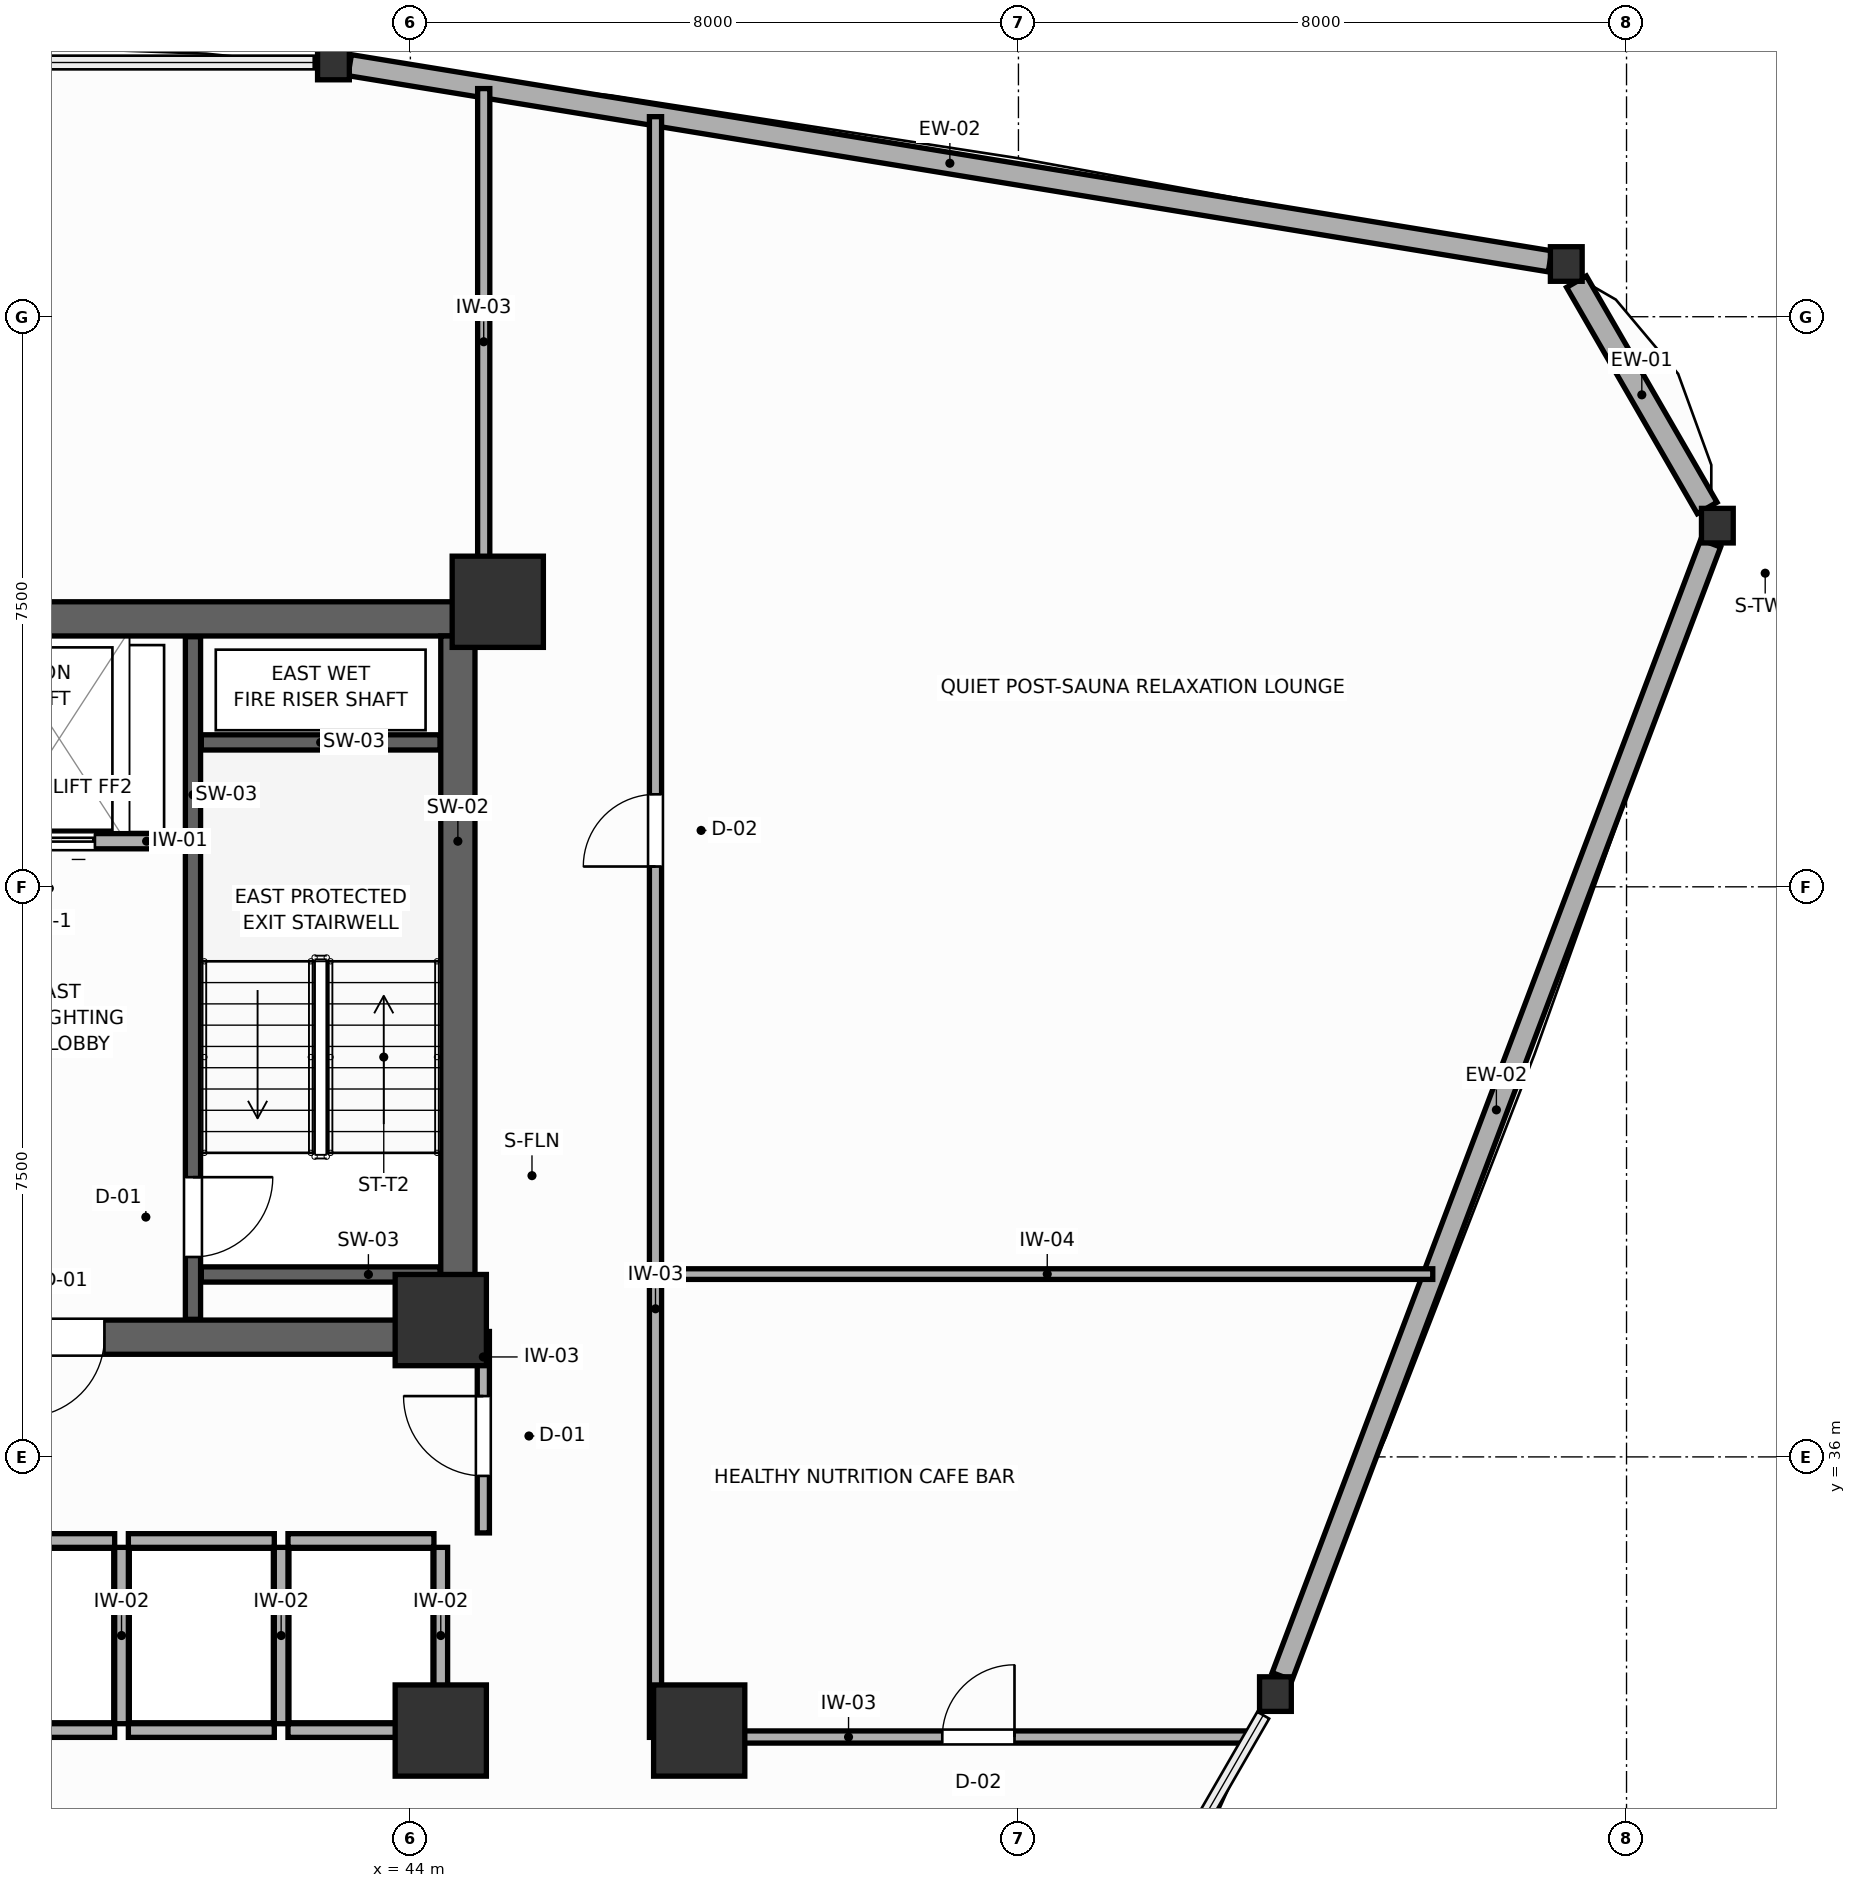
"""IFC4 building model, lengths in metres.
Left out: names, types, materials, properties, quantities, classifications, styles, units other than length and angle.
Written with IfcOpenShell. Run it as: python <this file> out.ifc"""

import sys

from ifc_helpers import new_model, si_unit, direction, frame, frame_2d, origin, origin_2d, place, context, subcontext, project, spatial, rectangle, i_section, extrude, source, transform, mapped, element, fill, save


model = new_model("IFC4")
c1 = context("Model", 3, precision=1e-05, world=origin(), true_north=direction((0.0, 1.0)))
c2 = subcontext(c1, "Body", "Model", "MODEL_VIEW")
j1 = project(units=[si_unit("LENGTHUNIT", "METRE"), si_unit("PLANEANGLEUNIT", "RADIAN")], contexts=[c1])
p1 = place(None, origin())
s1 = spatial("IfcSite", under=j1, at=p1, CompositionType="ELEMENT")
p2 = place(p1, origin())
s2 = spatial("IfcBuilding", under=s1, at=p2, CompositionType="ELEMENT")
p3 = place(p2, frame((0.0, 0.0, 113.4)))
s3 = spatial("IfcBuildingStorey", under=s2, at=p3, CompositionType="ELEMENT", Elevation=113.4)
p4 = place(p3, frame((27.15, 47.025, 0.0), z_axis=(0.0, 0.0, 1.0), x_axis=(1.0, 0.0, 0.0)))
e1 = element("IfcWall", 1, at=p4, inside=s3, PredefinedType="SHEAR", context=c2, shape_type="SweptSolid", body=[
    extrude(rectangle(XDim=17.7, YDim=0.45, at=frame_2d((8.85, 0.0))), origin(), (0.0, 0.0, 1.0), 3.6),
])
p5 = place(p3, frame((27.15, 37.575, 0.0), z_axis=(0.0, 0.0, 1.0), x_axis=(1.0, 0.0, 0.0)))
e2 = element("IfcWall", 2, at=p5, inside=s3, PredefinedType="SHEAR", context=c2, shape_type="SweptSolid", body=[
    extrude(rectangle(XDim=17.7, YDim=0.45, at=frame_2d((8.85, 0.0))), origin(), (0.0, 0.0, 1.0), 3.6),
])
p6 = place(p5, frame((4.875, 0.0, 0.0)))
e3 = element("IfcOpeningElement", 3, at=p6, cuts=e2, PredefinedType="OPENING", context=c2, shape_type="SweptSolid", body=[
    extrude(rectangle(XDim=1.05, YDim=2.1, at=frame_2d((0.525, 1.05))), frame((0.0, 0.235, 0.0), z_axis=(0.0, -1.0, 0.0), x_axis=(1.0, 0.0, 0.0)), (0.0, 0.0, 1.0), 0.47),
])
p7 = place(p5, frame((11.775, 0.0, 0.0)))
e4 = element("IfcOpeningElement", 4, at=p7, cuts=e2, PredefinedType="OPENING", context=c2, shape_type="SweptSolid", body=[
    extrude(rectangle(XDim=1.05, YDim=2.1, at=frame_2d((0.525, 1.05))), frame((0.0, 0.235, 0.0), z_axis=(0.0, -1.0, 0.0), x_axis=(1.0, 0.0, 0.0)), (0.0, 0.0, 1.0), 0.47),
])
p8 = place(p3, frame((44.625, 37.8, 0.0), z_axis=(0.0, 0.0, 1.0), x_axis=(0.0, 1.0, 0.0)))
e5 = element("IfcWall", 5, at=p8, inside=s3, PredefinedType="SHEAR", context=c2, shape_type="SweptSolid", body=[
    extrude(rectangle(XDim=9.0, YDim=0.45, at=frame_2d((4.5, 0.0))), origin(), (0.0, 0.0, 1.0), 3.6),
])
m1 = source(origin(), c2, "Body", "SweptSolid", [
    extrude(rectangle(XDim=1.2, YDim=1.2, at=origin_2d()), origin(), (0.0, 0.0, 1.0), 3.6),
])
for number, where, z_axis, x_axis in (
    (6, (45.15, 47.25, 0.0), (0.0, 0.0, 1.0), (1.0, 0.0, 0.0)),
    (7, (44.4, 37.8, 0.0), (0.0, 0.0, 1.0), (1.0, 0.0, 0.0)),
    (8, (44.4, 32.4, 0.0), (0.0, 0.0, 1.0), (1.0, 0.0, 0.0)),
    (9, (47.8, 32.4, 0.0), (0.0, 0.0, 1.0), (1.0, 0.0, 0.0)),
):
    element("IfcColumn", number, at=place(p3, frame(where, z_axis=z_axis, x_axis=x_axis)), inside=s3, PredefinedType="COLUMN", context=c2, shape_type="MappedRepresentation", body=[
        mapped(m1, transform((0.0, 0.0, 0.0), scale=1.0)),
    ])
m2 = source(origin(), c2, "Body", "SweptSolid", [
    extrude(i_section(OverallWidth=0.418, OverallDepth=0.455, WebThickness=0.039, FlangeThickness=0.063, FilletRadius=0.015, at=origin_2d()), origin(), (0.0, 0.0, 1.0), 3.6),
])
for number, where, z_axis, x_axis in (
    (10, (61.195, 48.251, 0.0), (0.0, 0.0, 1.0), (1.0, 0.0, 0.0)),
    (11, (59.208, 51.694, 0.0), (0.0, 0.0, 1.0), (1.0, 0.0, 0.0)),
    (12, (42.988, 54.344, 0.0), (0.0, 0.0, 1.0), (1.0, 0.0, 0.0)),
    (13, (55.381, 32.879, 0.0), (0.0, 0.0, 1.0), (1.0, 0.0, 0.0)),
):
    element("IfcColumn", number, at=place(p3, frame(where, z_axis=z_axis, x_axis=x_axis)), inside=s3, PredefinedType="COLUMN", context=c2, shape_type="MappedRepresentation", body=[
        mapped(m2, transform((0.0, 0.0, 0.0), scale=1.0)),
    ])
p9 = place(p3, frame((61.061, 48.484, 0.0), z_axis=(0.0, 0.0, 1.0), x_axis=(-0.500064626416, 0.86598808849, 0.0)))
e14 = element("IfcWall", 14, at=p9, inside=s3, PredefinedType="SOLIDWALL", context=c2, shape_type="SweptSolid", body=[
    extrude(rectangle(XDim=3.438, YDim=0.3, at=frame_2d((1.719, 0.0))), origin(), (0.0, 0.0, 1.0), 1.87),
])
p10 = place(p3, frame((58.993, 51.729, 0.0), z_axis=(0.0, 0.0, 1.0), x_axis=(-0.98690696995, 0.161290522546, 0.0)))
e15 = element("IfcWall", 15, at=p10, inside=s3, PredefinedType="SOLIDWALL", context=c2, shape_type="SweptSolid", body=[
    extrude(rectangle(XDim=16.001, YDim=0.28, at=frame_2d((8.0, 0.0))), origin(), (0.0, 0.0, 1.0), 1.87),
])
p11 = place(p3, frame((55.469, 33.112, 0.0), z_axis=(0.0, 0.0, 1.0), x_axis=(0.353771130195, 0.935332019895, 0.0)))
e16 = element("IfcWall", 16, at=p11, inside=s3, PredefinedType="SOLIDWALL", context=c2, shape_type="SweptSolid", body=[
    extrude(rectangle(XDim=15.937, YDim=0.28, at=frame_2d((7.969, 0.0))), origin(), (0.0, 0.0, 1.0), 1.87),
])
p12 = place(p3, frame((41.14, 37.81, 0.0), z_axis=(0.0, 0.0, 1.0), x_axis=(0.0, 1.0, 0.0)))
e17 = element("IfcWall", 17, at=p12, inside=s3, PredefinedType="SHEAR", context=c2, shape_type="SweptSolid", body=[
    extrude(rectangle(XDim=8.98, YDim=0.2, at=frame_2d((4.49, 0.0))), origin(), (0.0, 0.0, 1.0), 3.6),
])
p13 = place(p12, frame((0.82, 0.0, 0.0)))
e18 = element("IfcOpeningElement", 18, at=p13, cuts=e17, PredefinedType="OPENING", context=c2, shape_type="SweptSolid", body=[
    extrude(rectangle(XDim=1.05, YDim=2.1, at=frame_2d((0.525, 1.05))), frame((0.0, 0.11, 0.0), z_axis=(0.0, -1.0, 0.0), x_axis=(1.0, 0.0, 0.0)), (0.0, 0.0, 1.0), 0.22),
])
for number, where, z_axis, x_axis in (
    (19, (41.25, 45.4, 0.0), (0.0, 0.0, 1.0), (1.0, 0.0, 0.0)),
    (20, (41.25, 38.4, 0.0), (0.0, 0.0, 1.0), (1.0, 0.0, 0.0)),
):
    element("IfcWall", number, at=place(p3, frame(where, z_axis=z_axis, x_axis=x_axis)), inside=s3, PredefinedType="SHEAR", context=c2, shape_type="SweptSolid", body=[
        extrude(rectangle(XDim=3.14, YDim=0.2, at=frame_2d((1.57, 0.0))), origin(), (0.0, 0.0, 1.0), 3.6),
    ])
p14 = place(p3, frame((37.65, 44.1, 0.0), z_axis=(0.0, 0.0, 1.0), x_axis=(1.0, 0.0, 0.0)))
e21 = element("IfcWall", 21, at=p14, inside=s3, PredefinedType="PARTITIONING", context=c2, shape_type="SweptSolid", body=[
    extrude(rectangle(XDim=3.38, YDim=0.2, at=frame_2d((1.69, 0.0))), origin(), (0.0, 0.0, 1.0), 3.4),
])
p15 = place(p14, frame((1.0, 0.0, 0.0)))
e22 = element("IfcOpeningElement", 22, at=p15, cuts=e21, PredefinedType="OPENING", context=c2, shape_type="SweptSolid", body=[
    extrude(rectangle(XDim=1.2, YDim=2.1, at=frame_2d((0.6, 1.05))), frame((0.0, 0.11, 0.0), z_axis=(0.0, -1.0, 0.0), x_axis=(1.0, 0.0, 0.0)), (0.0, 0.0, 1.0), 0.22),
])
p16 = place(p3, frame((38.19, 34.9, 0.0), z_axis=(0.0, 0.0, 1.0), x_axis=(1.0, 0.0, 0.0)))
e23 = element("IfcWall", 23, at=p16, inside=s3, PredefinedType="PARTITIONING", context=c2, shape_type="SweptSolid", body=[
    extrude(rectangle(XDim=1.92, YDim=0.18, at=frame_2d((0.96, 0.0))), origin(), (0.0, 0.0, 1.0), 3.4),
])
p17 = place(p3, frame((38.19, 32.4, 0.0), z_axis=(0.0, 0.0, 1.0), x_axis=(1.0, 0.0, 0.0)))
e24 = element("IfcWall", 24, at=p17, inside=s3, PredefinedType="PARTITIONING", context=c2, shape_type="SweptSolid", body=[
    extrude(rectangle(XDim=1.92, YDim=0.18, at=frame_2d((0.96, 0.0))), origin(), (0.0, 0.0, 1.0), 2.16),
])
p18 = place(p3, frame((40.29, 34.9, 0.0), z_axis=(0.0, 0.0, 1.0), x_axis=(1.0, 0.0, 0.0)))
e25 = element("IfcWall", 25, at=p18, inside=s3, PredefinedType="PARTITIONING", context=c2, shape_type="SweptSolid", body=[
    extrude(rectangle(XDim=1.92, YDim=0.18, at=frame_2d((0.96, 0.0))), origin(), (0.0, 0.0, 1.0), 3.4),
])
p19 = place(p3, frame((40.29, 32.4, 0.0), z_axis=(0.0, 0.0, 1.0), x_axis=(1.0, 0.0, 0.0)))
e26 = element("IfcWall", 26, at=p19, inside=s3, PredefinedType="PARTITIONING", context=c2, shape_type="SweptSolid", body=[
    extrude(rectangle(XDim=1.92, YDim=0.18, at=frame_2d((0.96, 0.0))), origin(), (0.0, 0.0, 1.0), 2.16),
])
p20 = place(p3, frame((40.2, 32.49, 0.0), z_axis=(0.0, 0.0, 1.0), x_axis=(0.0, 1.0, 0.0)))
e27 = element("IfcWall", 27, at=p20, inside=s3, PredefinedType="PARTITIONING", context=c2, shape_type="SweptSolid", body=[
    extrude(rectangle(XDim=2.32, YDim=0.18, at=frame_2d((1.16, 0.0))), origin(), (0.0, 0.0, 1.0), 3.4),
])
p21 = place(p3, frame((42.39, 34.9, 0.0), z_axis=(0.0, 0.0, 1.0), x_axis=(1.0, 0.0, 0.0)))
e28 = element("IfcWall", 28, at=p21, inside=s3, PredefinedType="PARTITIONING", context=c2, shape_type="SweptSolid", body=[
    extrude(rectangle(XDim=1.92, YDim=0.18, at=frame_2d((0.96, 0.0))), origin(), (0.0, 0.0, 1.0), 3.4),
])
p22 = place(p3, frame((42.39, 32.4, 0.0), z_axis=(0.0, 0.0, 1.0), x_axis=(1.0, 0.0, 0.0)))
e29 = element("IfcWall", 29, at=p22, inside=s3, PredefinedType="PARTITIONING", context=c2, shape_type="SweptSolid", body=[
    extrude(rectangle(XDim=1.92, YDim=0.18, at=frame_2d((0.96, 0.0))), origin(), (0.0, 0.0, 1.0), 2.16),
])
for number, where, z_axis, x_axis in (
    (30, (42.3, 32.49, 0.0), (0.0, 0.0, 1.0), (0.0, 1.0, 0.0)),
    (31, (44.4, 32.49, 0.0), (0.0, 0.0, 1.0), (0.0, 1.0, 0.0)),
):
    element("IfcWall", number, at=place(p3, frame(where, z_axis=z_axis, x_axis=x_axis)), inside=s3, PredefinedType="PARTITIONING", context=c2, shape_type="SweptSolid", body=[
        extrude(rectangle(XDim=2.32, YDim=0.18, at=frame_2d((1.16, 0.0))), origin(), (0.0, 0.0, 1.0), 3.4),
    ])
p23 = place(p3, frame((44.96, 35.0, 0.0), z_axis=(0.0, 0.0, 1.0), x_axis=(0.0, 1.0, 0.0)))
e32 = element("IfcWall", 32, at=p23, inside=s3, PredefinedType="PARTITIONING", context=c2, shape_type="SweptSolid", body=[
    extrude(rectangle(XDim=2.65, YDim=0.16, at=frame_2d((1.325, 0.0))), origin(), (0.0, 0.0, 1.0), 3.4),
])
p24 = place(p23, frame((0.75, 0.0, 0.0)))
e33 = element("IfcOpeningElement", 33, at=p24, cuts=e32, PredefinedType="OPENING", context=c2, shape_type="SweptSolid", body=[
    extrude(rectangle(XDim=1.05, YDim=2.1, at=frame_2d((0.525, 1.05))), frame((0.0, 0.09, 0.0), z_axis=(0.0, -1.0, 0.0), x_axis=(1.0, 0.0, 0.0)), (0.0, 0.0, 1.0), 0.18),
])
p25 = place(p3, frame((47.225, 32.31, 0.0), z_axis=(0.0, 0.0, 1.0), x_axis=(0.0, 1.0, 0.0)))
e34 = element("IfcWall", 34, at=p25, inside=s3, PredefinedType="PARTITIONING", context=c2, shape_type="SweptSolid", body=[
    extrude(rectangle(XDim=21.322, YDim=0.16, at=frame_2d((10.661, 0.0))), origin(), (0.0, 0.0, 1.0), 3.4),
])
p26 = place(p25, frame((11.457, 0.0, 0.0)))
e35 = element("IfcOpeningElement", 35, at=p26, cuts=e34, PredefinedType="OPENING", context=c2, shape_type="SweptSolid", body=[
    extrude(rectangle(XDim=0.95, YDim=2.05, at=frame_2d((0.475, 1.025))), frame((0.0, 0.09, 0.0), z_axis=(0.0, -1.0, 0.0), x_axis=(1.0, 0.0, 0.0)), (0.0, 0.0, 1.0), 0.18),
])
p27 = place(p3, frame((47.307, 32.315, 0.0), z_axis=(0.0, 0.0, 1.0), x_axis=(1.0, 0.0, 0.0)))
e36 = element("IfcWall", 36, at=p27, inside=s3, PredefinedType="PARTITIONING", context=c2, shape_type="SweptSolid", body=[
    extrude(rectangle(XDim=7.728, YDim=0.16, at=frame_2d((3.864, 0.0))), origin(), (0.0, 0.0, 1.0), 2.16),
])
p28 = place(p27, frame((3.691, 0.0, 0.0)))
e37 = element("IfcOpeningElement", 37, at=p28, cuts=e36, PredefinedType="OPENING", context=c2, shape_type="SweptSolid", body=[
    extrude(rectangle(XDim=0.95, YDim=2.05, at=frame_2d((0.475, 1.025))), frame((0.0, 0.09, 0.0), z_axis=(0.0, -1.0, 0.0), x_axis=(1.0, 0.0, 0.0)), (0.0, 0.0, 1.0), 0.18),
])
p29 = place(p3, frame((44.965, 47.34, 0.0), z_axis=(0.0, 0.0, 1.0), x_axis=(0.0, 1.0, 0.0)))
e38 = element("IfcWall", 38, at=p29, inside=s3, PredefinedType="PARTITIONING", context=c2, shape_type="SweptSolid", body=[
    extrude(rectangle(XDim=6.661, YDim=0.16, at=frame_2d((3.331, 0.0))), origin(), (0.0, 0.0, 1.0), 2.16),
])
p30 = place(p3, frame((47.307, 38.405, 0.0), z_axis=(0.0, 0.0, 1.0), x_axis=(1.0, 0.0, 0.0)))
e39 = element("IfcWall", 39, at=p30, inside=s3, PredefinedType="PARTITIONING", context=c2, shape_type="SweptSolid", body=[
    extrude(rectangle(XDim=10.144, YDim=0.14, at=frame_2d((5.072, 0.0))), origin(), (0.0, 0.0, 1.0), 3.4),
])
p31 = place(p13, frame((1.05, 0.0, 0.0), z_axis=(0.0, 0.0, 1.0), x_axis=(-1.0, 0.0, 0.0)))
e40 = element("IfcDoor", 40, at=p31, inside=s3, OperationType="SINGLE_SWING_LEFT", PredefinedType="DOOR", context=c2, shape_type="SweptSolid", body=[
    extrude(rectangle(XDim=1.05, YDim=2.1, at=frame_2d((0.525, 1.05))), frame((0.0, 0.025, 0.0), z_axis=(0.0, -1.0, 0.0), x_axis=(1.0, 0.0, 0.0)), (0.0, 0.0, 1.0), 0.05),
])
fill(e18, e40)
p32 = place(p15, origin())
e41 = element("IfcDoor", 41, at=p32, inside=s3, OperationType="DOUBLE_DOOR_SLIDING", PredefinedType="DOOR", context=c2, shape_type="SweptSolid", body=[
    extrude(rectangle(XDim=1.2, YDim=2.1, at=frame_2d((0.6, 1.05))), frame((0.0, 0.025, 0.0), z_axis=(0.0, -1.0, 0.0), x_axis=(1.0, 0.0, 0.0)), (0.0, 0.0, 1.0), 0.05),
])
fill(e22, e41)
p33 = place(p24, origin())
e42 = element("IfcDoor", 42, at=p33, inside=s3, OperationType="SINGLE_SWING_RIGHT", PredefinedType="DOOR", context=c2, shape_type="SweptSolid", body=[
    extrude(rectangle(XDim=1.05, YDim=2.1, at=frame_2d((0.525, 1.05))), frame((0.0, 0.025, 0.0), z_axis=(0.0, -1.0, 0.0), x_axis=(1.0, 0.0, 0.0)), (0.0, 0.0, 1.0), 0.05),
])
fill(e33, e42)
p34 = place(p26, origin())
e43 = element("IfcDoor", 43, at=p34, inside=s3, OperationType="SINGLE_SWING_LEFT", PredefinedType="DOOR", context=c2, shape_type="SweptSolid", body=[
    extrude(rectangle(XDim=0.95, YDim=2.05, at=frame_2d((0.475, 1.025))), frame((0.0, 0.025, 0.0), z_axis=(0.0, -1.0, 0.0), x_axis=(1.0, 0.0, 0.0)), (0.0, 0.0, 1.0), 0.05),
])
fill(e35, e43)
p35 = place(p28, origin())
e44 = element("IfcDoor", 44, at=p35, inside=s3, OperationType="SINGLE_SWING_RIGHT", PredefinedType="DOOR", context=c2, shape_type="SweptSolid", body=[
    extrude(rectangle(XDim=0.95, YDim=2.05, at=frame_2d((0.475, 1.025))), frame((0.0, 0.025, 0.0), z_axis=(0.0, -1.0, 0.0), x_axis=(1.0, 0.0, 0.0)), (0.0, 0.0, 1.0), 0.05),
])
fill(e37, e44)
p36 = place(p7, frame((1.05, 0.0, 0.0), z_axis=(0.0, 0.0, 1.0), x_axis=(-1.0, 0.0, 0.0)))
e45 = element("IfcDoor", 45, at=p36, inside=s3, OperationType="SINGLE_SWING_RIGHT", PredefinedType="DOOR", context=c2, shape_type="SweptSolid", body=[
    extrude(rectangle(XDim=1.05, YDim=2.1, at=frame_2d((0.525, 1.05))), frame((0.0, 0.025, 0.0), z_axis=(0.0, -1.0, 0.0), x_axis=(1.0, 0.0, 0.0)), (0.0, 0.0, 1.0), 0.05),
])
fill(e4, e45)
save(model, sys.argv[1])
